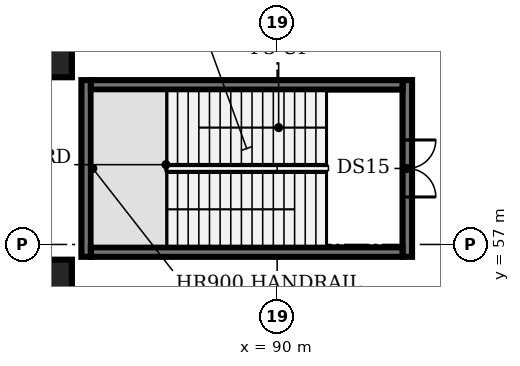
"""IFC4 building model, lengths in metres.
Left out: names, types, materials, properties, quantities, classifications, styles, units other than length and angle.
Written with IfcOpenShell. Run it as: python <this file> out.ifc"""

import sys

from ifc_helpers import new_model, si_unit, direction, frame, frame_2d, origin, origin_2d, place, context, subcontext, project, spatial, rectangle, extrude, element, fill, save


model = new_model("IFC4")
c1 = context("Model", 3, precision=1e-05, world=origin(), true_north=direction((0.0, 1.0)))
c2 = subcontext(c1, "Body", "Model", "MODEL_VIEW")
j1 = project(units=[si_unit("LENGTHUNIT", "METRE"), si_unit("PLANEANGLEUNIT", "RADIAN")], contexts=[c1])
p1 = place(None, origin())
s1 = spatial("IfcSite", under=j1, at=p1, CompositionType="ELEMENT")
p2 = place(p1, origin())
s2 = spatial("IfcBuilding", under=s1, at=p2, CompositionType="ELEMENT")
p3 = place(p2, frame((0.0, 0.0, -6.0)))
s3 = spatial("IfcBuildingStorey", under=s2, at=p3, CompositionType="ELEMENT", Elevation=-6.0)
for number, where, z_axis, x_axis in (
    (1, (84.0, 56.0, -0.3), (0.0, 0.0, 1.0), (1.0, 0.0, 0.0)),
    (2, (84.0, 62.0, -0.3), (0.0, 0.0, 1.0), (1.0, 0.0, 0.0)),
):
    element("IfcColumn", number, at=place(p3, frame(where, z_axis=z_axis, x_axis=x_axis)), inside=s3, PredefinedType="COLUMN", context=c2, shape_type="SweptSolid", body=[
        extrude(rectangle(XDim=1.2, YDim=1.2, at=origin_2d()), origin(), (0.0, 0.0, 1.0), 5.95),
    ])
p4 = place(p3, frame((84.975, 56.675, 0.0), z_axis=(0.0, 0.0, 1.0), x_axis=(0.0, 1.0, 0.0)))
e3 = element("IfcWall", 3, at=p4, inside=s3, PredefinedType="SHEAR", context=c2, shape_type="SweptSolid", body=[
    extrude(rectangle(XDim=4.65, YDim=0.25, at=frame_2d((2.325, 0.0))), origin(), (0.0, 0.0, 1.0), 5.65),
])
p5 = place(p3, frame((93.425, 61.325, 0.0), z_axis=(0.0, 0.0, 1.0), x_axis=(0.0, -1.0, 0.0)))
e4 = element("IfcWall", 4, at=p5, inside=s3, PredefinedType="SHEAR", context=c2, shape_type="SweptSolid", body=[
    extrude(rectangle(XDim=4.65, YDim=0.25, at=frame_2d((2.325, 0.0))), origin(), (0.0, 0.0, 1.0), 5.65),
])
p6 = place(p5, frame((1.575, 0.0, 0.0)))
e5 = element("IfcOpeningElement", 5, at=p6, cuts=e4, PredefinedType="OPENING", context=c2, shape_type="SweptSolid", body=[
    extrude(rectangle(XDim=1.5, YDim=2.1, at=frame_2d((0.75, 1.05))), frame((0.0, 0.135, 0.0), z_axis=(0.0, -1.0, 0.0), x_axis=(1.0, 0.0, 0.0)), (0.0, 0.0, 1.0), 0.27),
])
for number, where, z_axis, x_axis in (
    (6, (85.1, 56.8, 0.0), (0.0, 0.0, 1.0), (1.0, 0.0, 0.0)),
    (7, (85.1, 61.2, 0.0), (0.0, 0.0, 1.0), (1.0, 0.0, 0.0)),
):
    element("IfcWall", number, at=place(p3, frame(where, z_axis=z_axis, x_axis=x_axis)), inside=s3, PredefinedType="SHEAR", context=c2, shape_type="SweptSolid", body=[
        extrude(rectangle(XDim=8.2, YDim=0.25, at=frame_2d((4.1, 0.0))), origin(), (0.0, 0.0, 1.0), 5.65),
    ])
p7 = place(p6, origin())
e8 = element("IfcDoor", 8, at=p7, inside=s3, OperationType="DOUBLE_DOOR_SINGLE_SWING", PredefinedType="DOOR", context=c2, shape_type="SweptSolid", body=[
    extrude(rectangle(XDim=1.5, YDim=2.1, at=frame_2d((0.75, 1.05))), frame((0.0, 0.025, 0.0), z_axis=(0.0, -1.0, 0.0), x_axis=(1.0, 0.0, 0.0)), (0.0, 0.0, 1.0), 0.05),
])
fill(e5, e8)
save(model, sys.argv[1])
